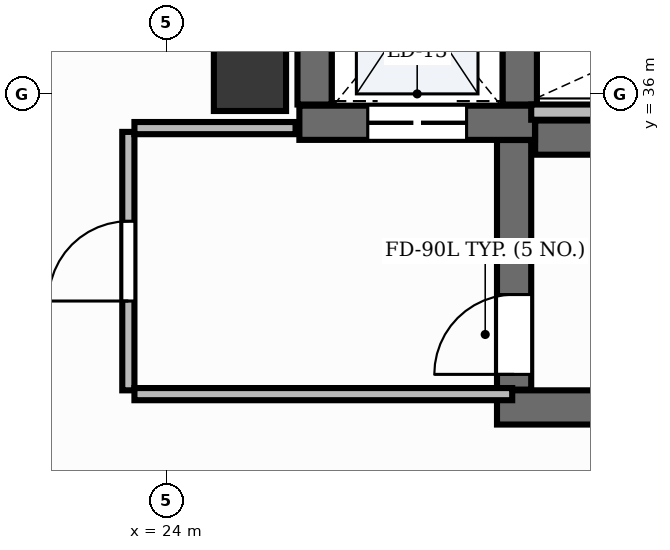
"""IFC4 building model, lengths in metres.
Left out: names, types, materials, properties, quantities, classifications, styles, units other than length and angle.
Written with IfcOpenShell. Run it as: python <this file> out.ifc"""

import sys

from ifc_helpers import new_model, si_unit, direction, frame, frame_2d, origin, origin_2d, place, context, subcontext, project, spatial, rectangle, extrude, element, fill, save


model = new_model("IFC4")
c1 = context("Model", 3, precision=1e-05, world=origin(), true_north=direction((0.0, 1.0)))
c2 = subcontext(c1, "Body", "Model", "MODEL_VIEW")
j1 = project(units=[si_unit("LENGTHUNIT", "METRE"), si_unit("PLANEANGLEUNIT", "RADIAN")], contexts=[c1])
p1 = place(None, origin())
s1 = spatial("IfcSite", under=j1, at=p1, CompositionType="ELEMENT")
p2 = place(p1, origin())
s2 = spatial("IfcBuilding", under=s1, at=p2, CompositionType="ELEMENT")
p3 = place(p2, frame((0.0, 0.0, 148.8)))
s3 = spatial("IfcBuildingStorey", under=s2, at=p3, CompositionType="ELEMENT", Elevation=148.8)
p4 = place(p3, frame((28.852, 35.425, 0.0), z_axis=(0.0, 0.0, 1.0), x_axis=(1.0, 0.0, 0.0)))
e1 = element("IfcWall", 1, at=p4, inside=s3, PredefinedType="SHEAR", context=c2, shape_type="SweptSolid", body=[
    extrude(rectangle(XDim=8.248, YDim=0.45, at=frame_2d((4.124, 0.0))), origin(), (0.0, 0.0, 1.0), 5.1),
])
p5 = place(p3, frame((28.35, 31.875, 0.0), z_axis=(0.0, 0.0, 1.0), x_axis=(1.0, 0.0, 0.0)))
e2 = element("IfcWall", 2, at=p5, inside=s3, PredefinedType="SHEAR", context=c2, shape_type="SweptSolid", body=[
    extrude(rectangle(XDim=8.75, YDim=0.45, at=frame_2d((4.375, 0.0))), origin(), (0.0, 0.0, 1.0), 5.1),
])
p6 = place(p3, frame((28.575, 32.11, 0.0), z_axis=(0.0, 0.0, 1.0), x_axis=(0.0, 1.0, 0.0)))
e3 = element("IfcWall", 3, at=p6, inside=s3, PredefinedType="SHEAR", context=c2, shape_type="SweptSolid", body=[
    extrude(rectangle(XDim=3.283, YDim=0.45, at=frame_2d((1.642, 0.0))), origin(), (0.0, 0.0, 1.0), 5.1),
])
p7 = place(p6, frame((0.2, 0.0, 0.0)))
e4 = element("IfcOpeningElement", 4, at=p7, cuts=e3, PredefinedType="OPENING", context=c2, shape_type="SweptSolid", body=[
    extrude(rectangle(XDim=1.05, YDim=2.15, at=frame_2d((0.525, 1.075))), frame((0.0, 0.24, 0.0), z_axis=(0.0, -1.0, 0.0), x_axis=(1.0, 0.0, 0.0)), (0.0, 0.0, 1.0), 0.48),
])
p8 = place(p3, frame((25.75, 35.62, 0.0), z_axis=(0.0, 0.0, 1.0), x_axis=(1.0, 0.0, 0.0)))
e5 = element("IfcWall", 5, at=p8, inside=s3, PredefinedType="SHEAR", context=c2, shape_type="SweptSolid", body=[
    extrude(rectangle(XDim=3.1, YDim=0.45, at=frame_2d((1.55, 0.0))), origin(), (0.0, 0.0, 1.0), 5.1),
])
p9 = place(p8, frame((0.9, 0.0, 0.0)))
e6 = element("IfcOpeningElement", 6, at=p9, cuts=e5, PredefinedType="OPENING", context=c2, shape_type="SweptSolid", body=[
    extrude(rectangle(XDim=1.3, YDim=2.2, at=frame_2d((0.65, 1.1))), frame((0.0, 0.24, 0.0), z_axis=(0.0, -1.0, 0.0), x_axis=(1.0, 0.0, 0.0)), (0.0, 0.0, 1.0), 0.48),
])
for number, where, z_axis, x_axis in (
    (7, (25.95, 35.86, 0.0), (0.0, 0.0, 1.0), (0.0, 1.0, 0.0)),
    (8, (28.65, 35.86, 0.0), (0.0, 0.0, 1.0), (0.0, 1.0, 0.0)),
):
    element("IfcWall", number, at=place(p3, frame(where, z_axis=z_axis, x_axis=x_axis)), inside=s3, PredefinedType="SHEAR", context=c2, shape_type="SweptSolid", body=[
        extrude(rectangle(XDim=2.7, YDim=0.45, at=frame_2d((1.35, 0.0))), origin(), (0.0, 0.0, 1.0), 5.1),
    ])
p10 = place(p3, frame((25.1, 36.25, -0.0), z_axis=(0.0, 0.0, 1.0), x_axis=(1.0, 0.0, 0.0)))
e9 = element("IfcColumn", 9, at=p10, inside=s3, PredefinedType="PILASTER", context=c2, shape_type="SweptSolid", body=[
    extrude(rectangle(XDim=0.95, YDim=0.95, at=origin_2d()), origin(), (0.0, 0.0, 1.0), 5.101),
])
p11 = place(p3, frame((28.8, 35.76, 0.0), z_axis=(0.0, 0.0, 1.0), x_axis=(1.0, 0.0, 0.0)))
e10 = element("IfcWall", 10, at=p11, inside=s3, PredefinedType="PARTITIONING", context=c2, shape_type="SweptSolid", body=[
    extrude(rectangle(XDim=4.57, YDim=0.2, at=frame_2d((2.285, 0.0))), origin(), (0.0, 0.0, 1.0), 3.96),
])
p12 = place(p3, frame((23.5, 32.1, 0.0), z_axis=(0.0, 0.0, 1.0), x_axis=(0.0, 1.0, 0.0)))
e11 = element("IfcWall", 11, at=p12, inside=s3, PredefinedType="PARTITIONING", context=c2, shape_type="SweptSolid", body=[
    extrude(rectangle(XDim=3.4, YDim=0.16, at=frame_2d((1.7, 0.0))), origin(), (0.0, 0.0, 1.0), 3.96),
])
p13 = place(p12, frame((1.175, 0.0, 0.0)))
e12 = element("IfcOpeningElement", 12, at=p13, cuts=e11, PredefinedType="OPENING", context=c2, shape_type="SweptSolid", body=[
    extrude(rectangle(XDim=1.05, YDim=2.15, at=frame_2d((0.525, 1.075))), frame((0.0, 0.095, 0.0), z_axis=(0.0, -1.0, 0.0), x_axis=(1.0, 0.0, 0.0)), (0.0, 0.0, 1.0), 0.19),
])
p14 = place(p3, frame((23.58, 32.05, 0.0), z_axis=(0.0, 0.0, 1.0), x_axis=(1.0, 0.0, 0.0)))
e13 = element("IfcWall", 13, at=p14, inside=s3, PredefinedType="PARTITIONING", context=c2, shape_type="SweptSolid", body=[
    extrude(rectangle(XDim=4.97, YDim=0.16, at=frame_2d((2.485, 0.0))), origin(), (0.0, 0.0, 1.0), 3.96),
])
p15 = place(p3, frame((23.58, 35.55, 0.0), z_axis=(0.0, 0.0, 1.0), x_axis=(1.0, 0.0, 0.0)))
e14 = element("IfcWall", 14, at=p15, inside=s3, PredefinedType="PARTITIONING", context=c2, shape_type="SweptSolid", body=[
    extrude(rectangle(XDim=2.12, YDim=0.16, at=frame_2d((1.06, 0.0))), origin(), (0.0, 0.0, 1.0), 3.96),
])
p16 = place(p7, origin())
e15 = element("IfcDoor", 15, at=p16, inside=s3, OperationType="SINGLE_SWING_LEFT", PredefinedType="DOOR", context=c2, shape_type="SweptSolid", body=[
    extrude(rectangle(XDim=1.05, YDim=2.15, at=frame_2d((0.525, 1.075))), frame((0.0, 0.025, 0.0), z_axis=(0.0, -1.0, 0.0), x_axis=(1.0, 0.0, 0.0)), (0.0, 0.0, 1.0), 0.05),
])
fill(e4, e15)
p17 = place(p9, origin())
e16 = element("IfcDoor", 16, at=p17, inside=s3, OperationType="DOUBLE_DOOR_SLIDING", PredefinedType="DOOR", context=c2, shape_type="SweptSolid", body=[
    extrude(rectangle(XDim=1.3, YDim=2.2, at=frame_2d((0.65, 1.1))), frame((0.0, 0.025, 0.0), z_axis=(0.0, -1.0, 0.0), x_axis=(1.0, 0.0, 0.0)), (0.0, 0.0, 1.0), 0.05),
])
fill(e6, e16)
p18 = place(p13, origin())
e17 = element("IfcDoor", 17, at=p18, inside=s3, OperationType="SINGLE_SWING_LEFT", PredefinedType="DOOR", context=c2, shape_type="SweptSolid", body=[
    extrude(rectangle(XDim=1.05, YDim=2.15, at=frame_2d((0.525, 1.075))), frame((0.0, 0.025, 0.0), z_axis=(0.0, -1.0, 0.0), x_axis=(1.0, 0.0, 0.0)), (0.0, 0.0, 1.0), 0.05),
])
fill(e12, e17)
save(model, sys.argv[1])
